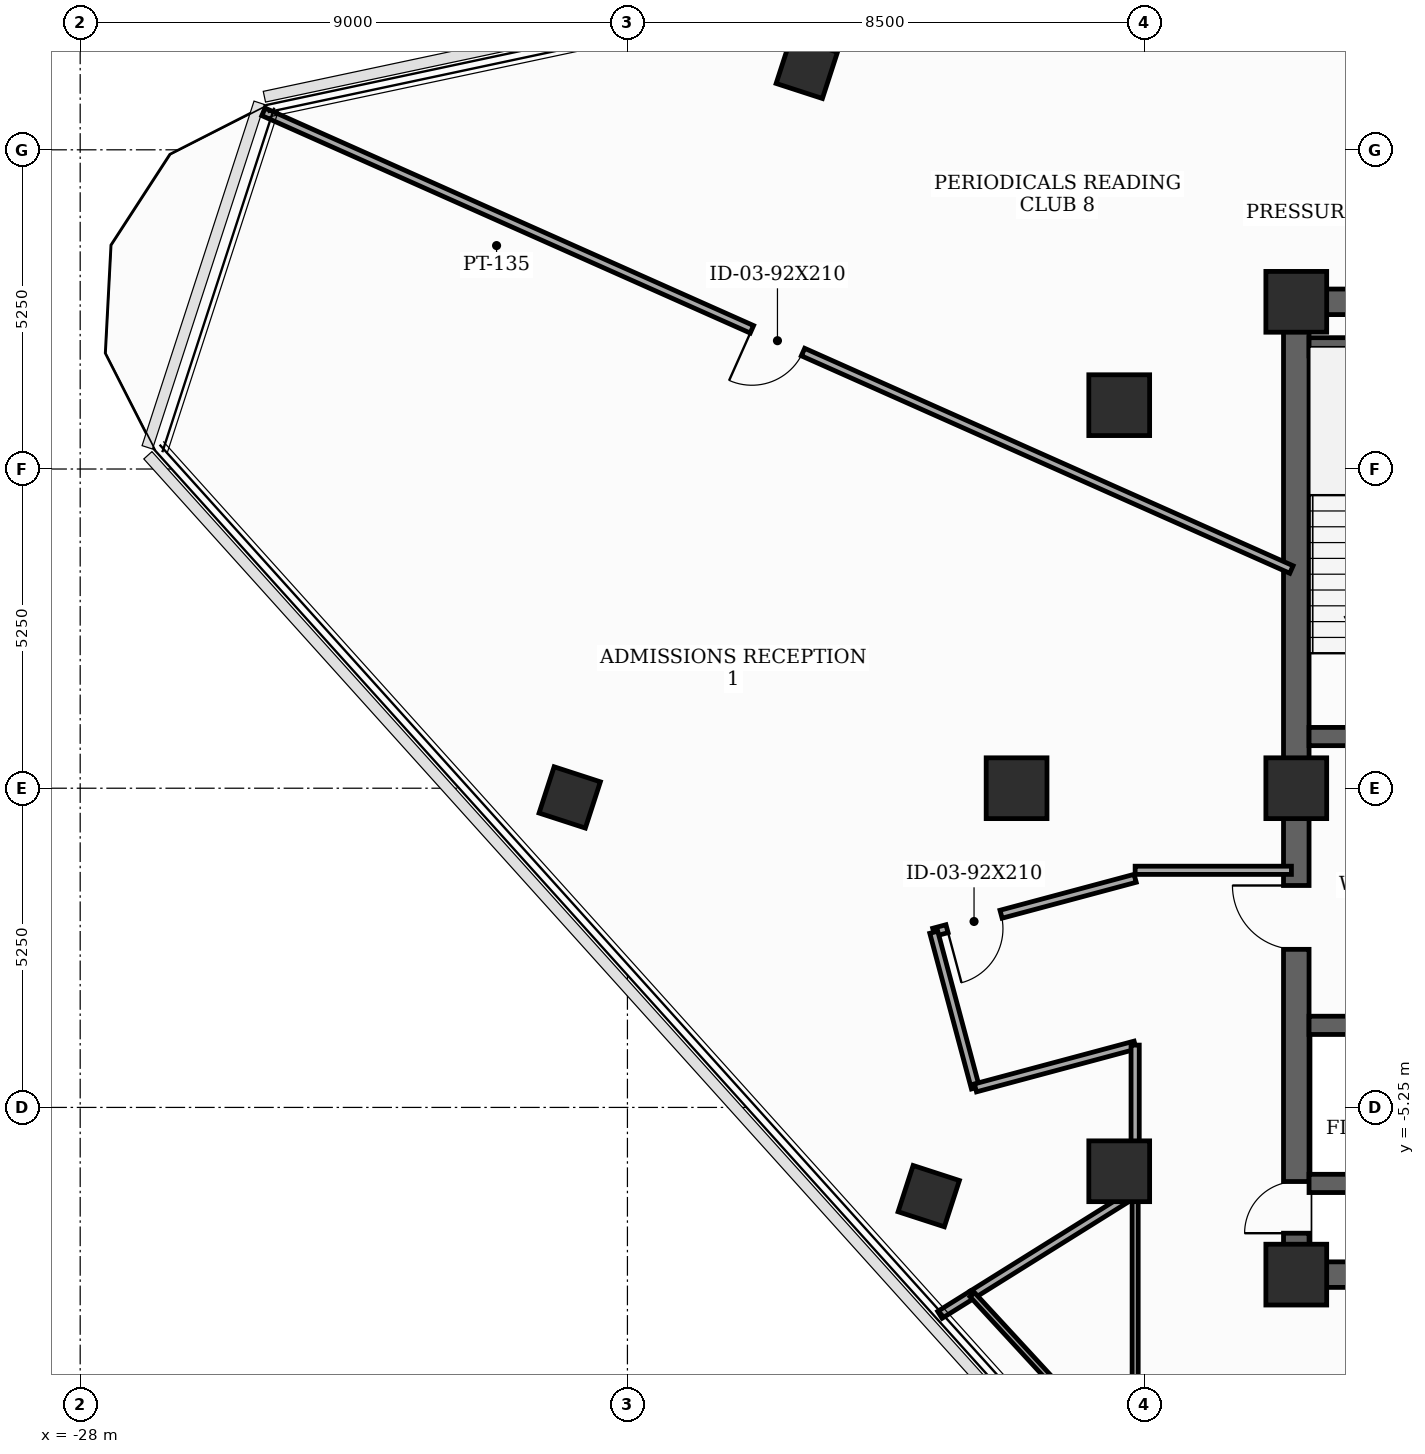
"""IFC4 building model, lengths in metres.
Left out: names, types, materials, properties, quantities, classifications, styles, units other than length and angle.
Written with IfcOpenShell. Run it as: python <this file> out.ifc"""

import sys

from ifc_helpers import new_model, si_unit, direction, frame, frame_2d, origin, origin_2d, place, context, subcontext, project, spatial, rectangle, extrude, element, fill, save


model = new_model("IFC4")
c1 = context("Model", 3, precision=1e-05, world=origin(), true_north=direction((0.0, 1.0)))
c2 = subcontext(c1, "Body", "Model", "MODEL_VIEW")
j1 = project(units=[si_unit("LENGTHUNIT", "METRE"), si_unit("PLANEANGLEUNIT", "RADIAN")], contexts=[c1])
p1 = place(None, origin())
s1 = spatial("IfcSite", under=j1, at=p1, CompositionType="ELEMENT")
p2 = place(p1, origin())
s2 = spatial("IfcBuilding", under=s1, at=p2, CompositionType="ELEMENT")
p3 = place(p2, frame((0.0, 0.0, 286.9)))
s3 = spatial("IfcBuildingStorey", under=s2, at=p3, CompositionType="ELEMENT", Elevation=286.9)
for number, where, z_axis, x_axis in (
    (1, (-8.0, -8.0, 0.0), (0.0, 0.0, 1.0), (1.0, 0.0, 0.0)),
    (2, (-8.0, 8.0, 0.0), (0.0, 0.0, 1.0), (1.0, 0.0, 0.0)),
    (3, (-8.0, 0.0, 0.0), (0.0, 0.0, 1.0), (1.0, 0.0, 0.0)),
    (4, (-10.912, 6.3, 0.0), (0.0, 0.0, 1.0), (1.0, 0.0, 0.0)),
    (5, (-12.6, 0.0, 0.0), (0.0, 0.0, 1.0), (1.0, 0.0, 0.0)),
    (6, (-10.912, -6.3, 0.0), (0.0, 0.0, 1.0), (1.0, 0.0, 0.0)),
):
    element("IfcColumn", number, at=place(p3, frame(where, z_axis=z_axis, x_axis=x_axis)), inside=s3, PredefinedType="COLUMN", context=c2, shape_type="SweptSolid", body=[
        extrude(rectangle(XDim=1.0, YDim=1.0, at=origin_2d()), origin(), (0.0, 0.0, 1.0), 3.7),
    ])
for number, where, z_axis, x_axis in (
    (7, (-16.05, 11.848, 0.0), (0.0, 0.0, 1.0), (0.309, 0.951, 0.0)),
    (8, (-19.949, -0.151, 0.0), (0.0, 0.0, 1.0), (0.309, 0.951, 0.0)),
    (9, (-14.045, -6.709, 0.0), (0.0, 0.0, 1.0), (0.309, 0.951, 0.0)),
):
    element("IfcColumn", number, at=place(p3, frame(where, z_axis=z_axis, x_axis=x_axis)), inside=s3, PredefinedType="COLUMN", context=c2, shape_type="SweptSolid", body=[
        extrude(rectangle(XDim=0.8, YDim=0.8, at=origin_2d()), origin(), (0.0, 0.0, 1.0), 3.7),
    ])
p4 = place(p3, frame((-8.0, -8.0, 0.0), z_axis=(0.0, 0.0, 1.0), x_axis=(0.0, 1.0, 0.0)))
e10 = element("IfcWall", 10, at=p4, inside=s3, PredefinedType="SHEAR", context=c2, shape_type="SweptSolid", body=[
    extrude(rectangle(XDim=16.0, YDim=0.42, at=frame_2d((8.0, 0.0))), origin(), (0.0, 0.0, 1.0), 3.5),
])
p5 = place(p4, frame((0.681, 0.0, 0.0)))
e11 = element("IfcOpeningElement", 11, at=p5, cuts=e10, PredefinedType="OPENING", context=c2, shape_type="SweptSolid", body=[
    extrude(rectangle(XDim=0.85, YDim=2.02, at=frame_2d((0.425, 1.01))), frame((0.0, 0.22, 0.0), z_axis=(0.0, -1.0, 0.0), x_axis=(1.0, 0.0, 0.0)), (0.0, 0.0, 1.0), 0.44),
])
p6 = place(p4, frame((5.35, 0.0, 0.0)))
e12 = element("IfcOpeningElement", 12, at=p6, cuts=e10, PredefinedType="OPENING", context=c2, shape_type="SweptSolid", body=[
    extrude(rectangle(XDim=1.05, YDim=2.15, at=frame_2d((0.525, 1.075))), frame((0.0, 0.22, 0.0), z_axis=(0.0, -1.0, 0.0), x_axis=(1.0, 0.0, 0.0)), (0.0, 0.0, 1.0), 0.44),
])
p7 = place(p3, frame((-8.0, -8.0, 0.0), z_axis=(0.0, 0.0, 1.0), x_axis=(1.0, 0.0, 0.0)))
e13 = element("IfcWall", 13, at=p7, inside=s3, PredefinedType="SHEAR", context=c2, shape_type="SweptSolid", body=[
    extrude(rectangle(XDim=16.0, YDim=0.42, at=frame_2d((8.0, 0.0))), origin(), (0.0, 0.0, 1.0), 3.5),
])
p8 = place(p7, frame((7.52, 0.0, 0.0)))
e14 = element("IfcOpeningElement", 14, at=p8, cuts=e13, PredefinedType="OPENING", context=c2, shape_type="SweptSolid", body=[
    extrude(rectangle(XDim=0.95, YDim=2.1, at=frame_2d((0.475, 1.05))), frame((0.0, 0.22, 0.0), z_axis=(0.0, -1.0, 0.0), x_axis=(1.0, 0.0, 0.0)), (0.0, 0.0, 1.0), 0.44),
])
p9 = place(p3, frame((-8.0, 8.0, 0.0), z_axis=(0.0, 0.0, 1.0), x_axis=(1.0, 0.0, 0.0)))
e15 = element("IfcWall", 15, at=p9, inside=s3, PredefinedType="SHEAR", context=c2, shape_type="SweptSolid", body=[
    extrude(rectangle(XDim=16.0, YDim=0.42, at=frame_2d((8.0, 0.0))), origin(), (0.0, 0.0, 1.0), 3.5),
])
p10 = place(p9, frame((7.1, 0.0, 0.0)))
e16 = element("IfcOpeningElement", 16, at=p10, cuts=e15, PredefinedType="OPENING", context=c2, shape_type="SweptSolid", body=[
    extrude(rectangle(XDim=1.8, YDim=2.15, at=frame_2d((0.9, 1.075))), frame((0.0, 0.22, 0.0), z_axis=(0.0, -1.0, 0.0), x_axis=(1.0, 0.0, 0.0)), (0.0, 0.0, 1.0), 0.44),
])
p11 = place(p3, frame((-7.79, 0.85, 0.0), z_axis=(0.0, 0.0, 1.0), x_axis=(1.0, 0.0, 0.0)))
e17 = element("IfcWall", 17, at=p11, inside=s3, PredefinedType="SHEAR", context=c2, shape_type="SweptSolid", body=[
    extrude(rectangle(XDim=3.34, YDim=0.3, at=frame_2d((1.67, 0.0))), origin(), (0.0, 0.0, 1.0), 3.5),
])
p12 = place(p11, frame((1.85, 0.0, 0.0)))
e18 = element("IfcOpeningElement", 18, at=p12, cuts=e17, PredefinedType="OPENING", context=c2, shape_type="SweptSolid", body=[
    extrude(rectangle(XDim=1.05, YDim=2.15, at=frame_2d((0.525, 1.075))), frame((0.0, 0.16, 0.0), z_axis=(0.0, -1.0, 0.0), x_axis=(1.0, 0.0, 0.0)), (0.0, 0.0, 1.0), 0.32),
])
p13 = place(p3, frame((-7.79, 7.26, 0.0), z_axis=(0.0, 0.0, 1.0), x_axis=(1.0, 0.0, 0.0)))
e19 = element("IfcWall", 19, at=p13, inside=s3, PredefinedType="SHEAR", context=c2, shape_type="SweptSolid", body=[
    extrude(rectangle(XDim=3.34, YDim=0.3, at=frame_2d((1.67, 0.0))), origin(), (0.0, 0.0, 1.0), 3.5),
])
p14 = place(p3, frame((-7.79, -3.9, 0.0), z_axis=(0.0, 0.0, 1.0), x_axis=(1.0, 0.0, 0.0)))
e20 = element("IfcWall", 20, at=p14, inside=s3, PredefinedType="SHEAR", context=c2, shape_type="SweptSolid", body=[
    extrude(rectangle(XDim=3.34, YDim=0.3, at=frame_2d((1.67, 0.0))), origin(), (0.0, 0.0, 1.0), 3.5),
])
p15 = place(p14, frame((1.27, 0.0, 0.0)))
e21 = element("IfcOpeningElement", 21, at=p15, cuts=e20, PredefinedType="OPENING", context=c2, shape_type="SweptSolid", body=[
    extrude(rectangle(XDim=1.1, YDim=2.1, at=frame_2d((0.55, 1.05))), frame((0.0, 0.16, 0.0), z_axis=(0.0, -1.0, 0.0), x_axis=(1.0, 0.0, 0.0)), (0.0, 0.0, 1.0), 0.32),
])
p16 = place(p3, frame((-7.79, -6.5, 0.0), z_axis=(0.0, 0.0, 1.0), x_axis=(1.0, 0.0, 0.0)))
e22 = element("IfcWall", 22, at=p16, inside=s3, PredefinedType="SHEAR", context=c2, shape_type="SweptSolid", body=[
    extrude(rectangle(XDim=3.34, YDim=0.3, at=frame_2d((1.67, 0.0))), origin(), (0.0, 0.0, 1.0), 3.5),
])
p17 = place(p3, frame((-8.08, -1.35, 0.0), z_axis=(0.0, 0.0, 1.0), x_axis=(-1.0, 0.0, 0.0)))
e23 = element("IfcWall", 23, at=p17, inside=s3, PredefinedType="PARTITIONING", context=c2, shape_type="SweptSolid", body=[
    extrude(rectangle(XDim=2.57, YDim=0.135, at=frame_2d((1.285, 0.0))), origin(), (0.0, 0.0, 1.0), 2.885),
])
p18 = place(p3, frame((-10.65, -1.482, 0.0), z_axis=(0.0, 0.0, 1.0), x_axis=(-0.965961397105, -0.2586862565, 0.0)))
e24 = element("IfcWall", 24, at=p18, inside=s3, PredefinedType="PARTITIONING", context=c2, shape_type="SweptSolid", body=[
    extrude(rectangle(XDim=3.429, YDim=0.135, at=frame_2d((1.714, 0.0))), origin(), (0.0, 0.0, 1.0), 2.885),
])
p19 = place(p18, frame((2.283, 0.0, 0.0)))
e25 = element("IfcOpeningElement", 25, at=p19, cuts=e24, PredefinedType="OPENING", context=c2, shape_type="SweptSolid", body=[
    extrude(rectangle(XDim=0.92, YDim=2.1, at=frame_2d((0.46, 1.05))), frame((0.0, 0.077, 0.0), z_axis=(0.0, -1.0, 0.0), x_axis=(1.0, 0.0, 0.0)), (0.0, 0.0, 1.0), 0.155),
])
p20 = place(p3, frame((-13.962, -2.369, 0.0), z_axis=(0.0, 0.0, 1.0), x_axis=(0.258413725385, -0.966034340245, 0.0)))
e26 = element("IfcWall", 26, at=p20, inside=s3, PredefinedType="PARTITIONING", context=c2, shape_type="SweptSolid", body=[
    extrude(rectangle(XDim=2.65, YDim=0.135, at=frame_2d((1.325, 0.0))), origin(), (0.0, 0.0, 1.0), 3.5),
])
p21 = place(p3, frame((-13.277, -4.929, 0.0), z_axis=(0.0, 0.0, 1.0), x_axis=(0.965934830229, 0.258785439601, 0.0)))
e27 = element("IfcWall", 27, at=p21, inside=s3, PredefinedType="PARTITIONING", context=c2, shape_type="SweptSolid", body=[
    extrude(rectangle(XDim=2.72, YDim=0.135, at=frame_2d((1.36, 0.0))), origin(), (0.0, 0.0, 1.0), 2.885),
])
p22 = place(p3, frame((-10.65, -4.225, 0.0), z_axis=(0.0, 0.0, 1.0), x_axis=(0.0, -1.0, 0.0)))
e28 = element("IfcWall", 28, at=p22, inside=s3, PredefinedType="PARTITIONING", context=c2, shape_type="SweptSolid", body=[
    extrude(rectangle(XDim=2.43, YDim=0.135, at=frame_2d((1.215, 0.0))), origin(), (0.0, 0.0, 1.0), 2.885),
])
p23 = place(p3, frame((-10.65, -6.655, 0.0), z_axis=(0.0, 0.0, 1.0), x_axis=(0.0, -1.0, 0.0)))
e29 = element("IfcWall", 29, at=p23, inside=s3, PredefinedType="MOVABLE", context=c2, shape_type="SweptSolid", body=[
    extrude(rectangle(XDim=3.495, YDim=0.1, at=frame_2d((1.748, 0.0))), origin(), (0.0, 0.0, 1.0), 2.885),
])
p24 = place(p3, frame((-13.329, -8.329, 0.0), z_axis=(0.0, 0.0, 1.0), x_axis=(0.848059079617, 0.529901686617, 0.0)))
e30 = element("IfcWall", 30, at=p24, inside=s3, PredefinedType="PARTITIONING", context=c2, shape_type="SweptSolid", body=[
    extrude(rectangle(XDim=3.159, YDim=0.135, at=frame_2d((1.58, 0.0))), origin(), (0.0, 0.0, 1.0), 2.885),
])
p25 = place(p3, frame((-13.861, -8.661, 0.0), z_axis=(0.0, 0.0, 1.0), x_axis=(0.848151340075, 0.529754003599, 0.0)))
e31 = element("IfcWall", 31, at=p25, inside=s3, PredefinedType="PARTITIONING", context=c2, shape_type="SweptSolid", body=[
    extrude(rectangle(XDim=0.627, YDim=0.135, at=frame_2d((0.313, 0.0))), origin(), (0.0, 0.0, 1.0), 3.5),
])
p26 = place(p3, frame((-8.08, 3.597, 0.0), z_axis=(0.0, 0.0, 1.0), x_axis=(-0.913542590258, 0.406743083266, 0.0)))
e32 = element("IfcWall", 32, at=p26, inside=s3, PredefinedType="PARTITIONING", context=c2, shape_type="SweptSolid", body=[
    extrude(rectangle(XDim=18.505, YDim=0.135, at=frame_2d((9.252, 0.0))), origin(), (0.0, 0.0, 1.0), 2.885),
])
p27 = place(p26, frame((8.792, 0.0, 0.0)))
e33 = element("IfcOpeningElement", 33, at=p27, cuts=e32, PredefinedType="OPENING", context=c2, shape_type="SweptSolid", body=[
    extrude(rectangle(XDim=0.92, YDim=2.1, at=frame_2d((0.46, 1.05))), frame((0.0, 0.077, 0.0), z_axis=(0.0, -1.0, 0.0), x_axis=(1.0, 0.0, 0.0)), (0.0, 0.0, 1.0), 0.155),
])
p28 = place(p3, frame((-13.329, -8.329, 0.0), z_axis=(0.0, 0.0, 1.0), x_axis=(0.677841155448, -0.735208384052, 0.0)))
e34 = element("IfcWall", 34, at=p28, inside=s3, PredefinedType="MOVABLE", context=c2, shape_type="SweptSolid", body=[
    extrude(rectangle(XDim=6.239, YDim=0.1, at=frame_2d((3.12, 0.0))), origin(), (0.0, 0.0, 1.0), 3.5),
])
p29 = place(p5, origin())
e35 = element("IfcDoor", 35, at=p29, inside=s3, OperationType="SINGLE_SWING_LEFT", PredefinedType="TRAPDOOR", context=c2, shape_type="SweptSolid", body=[
    extrude(rectangle(XDim=0.85, YDim=2.02, at=frame_2d((0.425, 1.01))), frame((0.0, 0.025, 0.0), z_axis=(0.0, -1.0, 0.0), x_axis=(1.0, 0.0, 0.0)), (0.0, 0.0, 1.0), 0.05),
])
fill(e11, e35)
p30 = place(p6, origin())
e36 = element("IfcDoor", 36, at=p30, inside=s3, OperationType="SINGLE_SWING_RIGHT", PredefinedType="DOOR", context=c2, shape_type="SweptSolid", body=[
    extrude(rectangle(XDim=1.05, YDim=2.15, at=frame_2d((0.525, 1.075))), frame((0.0, 0.025, 0.0), z_axis=(0.0, -1.0, 0.0), x_axis=(1.0, 0.0, 0.0)), (0.0, 0.0, 1.0), 0.05),
])
fill(e12, e36)
p31 = place(p19, origin())
e37 = element("IfcDoor", 37, at=p31, inside=s3, OperationType="SINGLE_SWING_RIGHT", PredefinedType="DOOR", context=c2, shape_type="SweptSolid", body=[
    extrude(rectangle(XDim=0.92, YDim=2.1, at=frame_2d((0.46, 1.05))), frame((0.0, 0.025, 0.0), z_axis=(0.0, -1.0, 0.0), x_axis=(1.0, 0.0, 0.0)), (0.0, 0.0, 1.0), 0.05),
])
fill(e25, e37)
p32 = place(p27, origin())
e38 = element("IfcDoor", 38, at=p32, inside=s3, OperationType="SINGLE_SWING_RIGHT", PredefinedType="DOOR", context=c2, shape_type="SweptSolid", body=[
    extrude(rectangle(XDim=0.92, YDim=2.1, at=frame_2d((0.46, 1.05))), frame((0.0, 0.025, 0.0), z_axis=(0.0, -1.0, 0.0), x_axis=(1.0, 0.0, 0.0)), (0.0, 0.0, 1.0), 0.05),
])
fill(e33, e38)
save(model, sys.argv[1])
